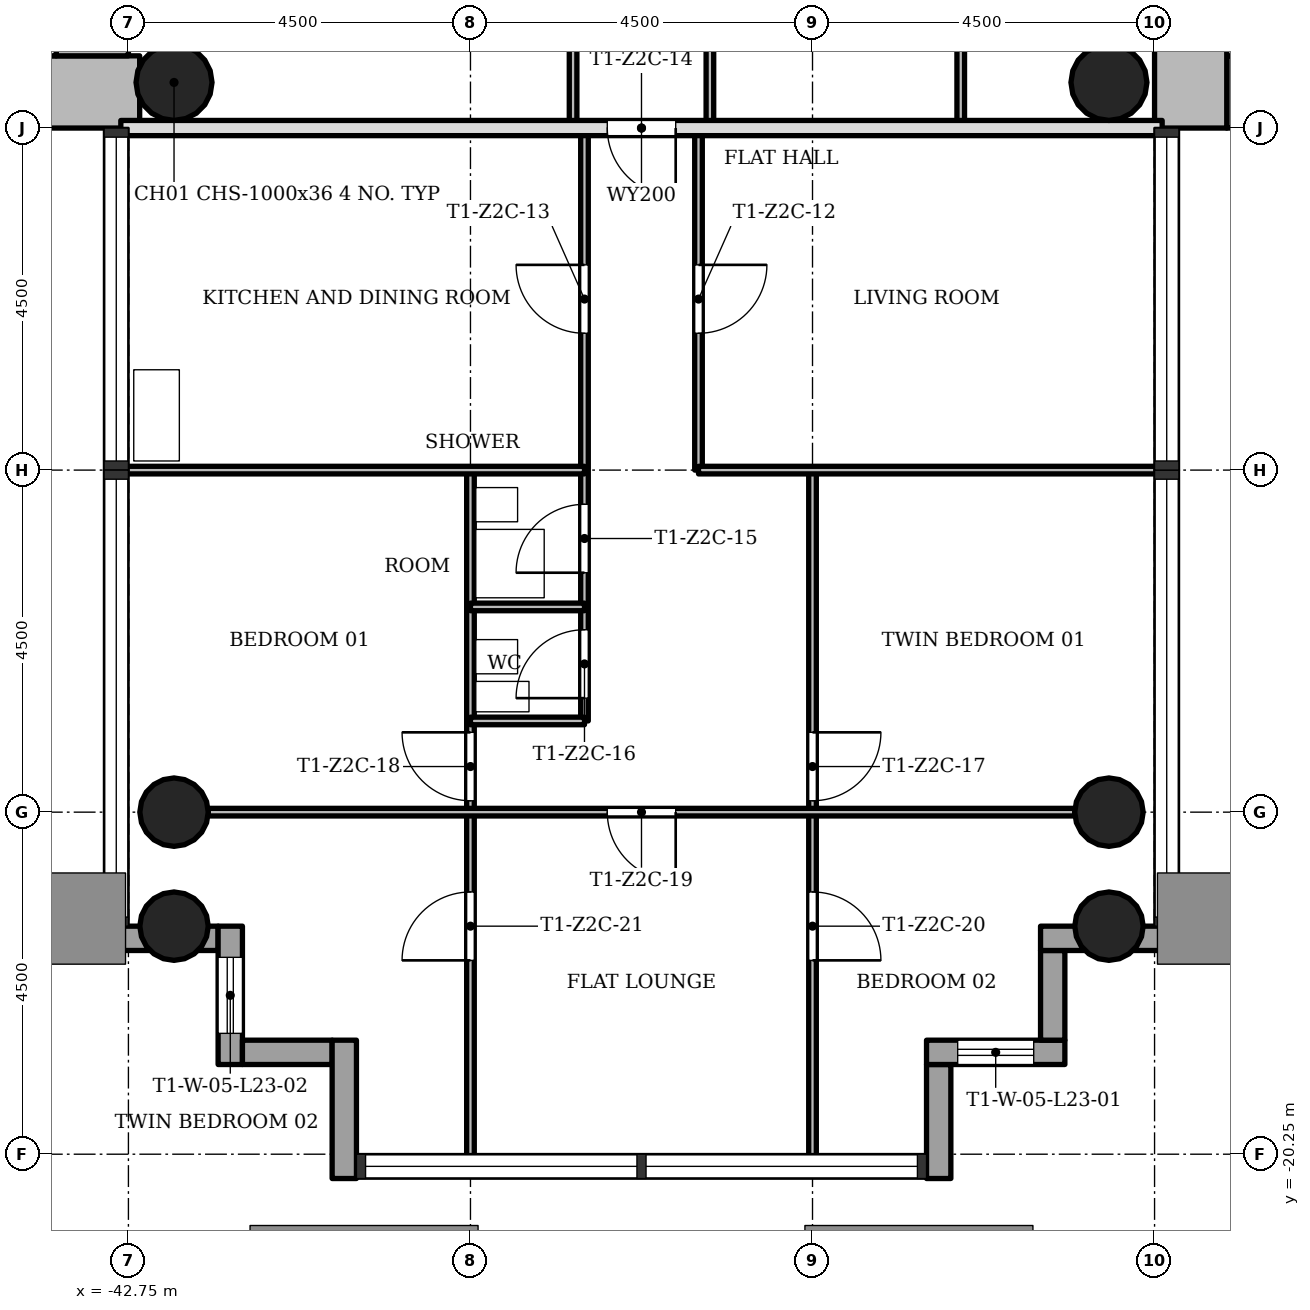
"""IFC4 building model, lengths in metres.
Left out: names, types, materials, properties, quantities, classifications, styles, units other than length and angle.
Written with IfcOpenShell. Run it as: python <this file> out.ifc"""

import sys

from ifc_helpers import new_model, si_unit, direction, frame, frame_2d, origin, origin_2d, place, context, subcontext, project, spatial, rectangle, hollow_circle, extrude, element, fill, save


model = new_model("IFC4")
c1 = context("Model", 3, precision=1e-05, world=origin(), true_north=direction((0.0, 1.0)))
c2 = subcontext(c1, "Body", "Model", "MODEL_VIEW")
j1 = project(units=[si_unit("LENGTHUNIT", "METRE"), si_unit("PLANEANGLEUNIT", "RADIAN")], contexts=[c1])
p1 = place(None, origin())
s1 = spatial("IfcSite", under=j1, at=p1, CompositionType="ELEMENT")
p2 = place(p1, origin())
s2 = spatial("IfcBuilding", under=s1, at=p2, CompositionType="ELEMENT")
p3 = place(p2, frame((0.0, 0.0, 86.8)))
s3 = spatial("IfcBuildingStorey", under=s2, at=p3, CompositionType="ELEMENT", Elevation=86.8)
p4 = place(p3, frame((-28.3, -6.275, 0.0), z_axis=(0.0, 0.0, 1.0), x_axis=(1.0, 0.0, 0.0)))
e1 = element("IfcWall", 1, at=p4, inside=s3, PredefinedType="SHEAR", context=c2, shape_type="SweptSolid", body=[
    extrude(rectangle(XDim=8.05, YDim=0.95, at=frame_2d((4.025, 0.0))), origin(), (0.0, 0.0, 1.0), 3.4),
])
p5 = place(p3, frame((-28.775, 5.8, 0.0), z_axis=(0.0, 0.0, 1.0), x_axis=(0.0, -1.0, 0.0)))
e2 = element("IfcWall", 2, at=p5, inside=s3, PredefinedType="SHEAR", context=c2, shape_type="SweptSolid", body=[
    extrude(rectangle(XDim=12.55, YDim=0.95, at=frame_2d((6.275, 0.0))), origin(), (0.0, 0.0, 1.0), 3.4),
])
p6 = place(p5, frame((4.9, 0.0, 0.0)))
e3 = element("IfcOpeningElement", 3, at=p6, cuts=e2, PredefinedType="OPENING", context=c2, shape_type="SweptSolid", body=[
    extrude(rectangle(XDim=1.8, YDim=2.1, at=frame_2d((0.9, 1.05))), frame((0.0, 0.485, 0.0), z_axis=(0.0, -1.0, 0.0), x_axis=(1.0, 0.0, 0.0)), (0.0, 0.0, 1.0), 0.97),
])
p7 = place(p3, frame((-51.298, -6.275, 0.0), z_axis=(0.0, 0.0, 1.0), x_axis=(1.0, 0.0, 0.0)))
e4 = element("IfcWall", 4, at=p7, inside=s3, PredefinedType="SHEAR", context=c2, shape_type="SweptSolid", body=[
    extrude(rectangle(XDim=8.696, YDim=0.95, at=frame_2d((4.348, 0.0))), origin(), (0.0, 0.0, 1.0), 3.4),
])
p8 = place(p3, frame((-43.225, -5.8, 0.0), z_axis=(0.0, 0.0, 1.0), x_axis=(0.0, 1.0, 0.0)))
e5 = element("IfcWall", 5, at=p8, inside=s3, PredefinedType="SHEAR", context=c2, shape_type="SweptSolid", body=[
    extrude(rectangle(XDim=12.55, YDim=0.95, at=frame_2d((6.275, 0.0))), origin(), (0.0, 0.0, 1.0), 3.4),
])
p9 = place(p8, frame((4.9, 0.0, 0.0)))
e6 = element("IfcOpeningElement", 6, at=p9, cuts=e5, PredefinedType="OPENING", context=c2, shape_type="SweptSolid", body=[
    extrude(rectangle(XDim=1.8, YDim=2.1, at=frame_2d((0.9, 1.05))), frame((0.0, 0.485, 0.0), z_axis=(0.0, -1.0, 0.0), x_axis=(1.0, 0.0, 0.0)), (0.0, 0.0, 1.0), 0.97),
])
for number, where, z_axis, x_axis in (
    (7, (-42.15, -15.75, 0.0), (0.0, 0.0, 1.0), (1.0, 0.0, 0.0)),
    (8, (-29.85, -15.75, 0.0), (0.0, 0.0, 1.0), (1.0, 0.0, 0.0)),
    (9, (-42.15, -17.25, 0.0), (0.0, 0.0, 1.0), (1.0, 0.0, 0.0)),
    (10, (-29.85, -17.25, 0.0), (0.0, 0.0, 1.0), (1.0, 0.0, 0.0)),
):
    element("IfcColumn", number, at=place(p3, frame(where, z_axis=z_axis, x_axis=x_axis)), inside=s3, PredefinedType="COLUMN", context=c2, shape_type="SweptSolid", body=[
        extrude(hollow_circle(Radius=0.45, WallThickness=0.032, at=origin_2d()), origin(), (0.0, 0.0, 1.0), 3.4),
    ])
for number, where, z_axis, x_axis in (
    (11, (-42.15, -6.15, 0.0), (0.0, 0.0, 1.0), (1.0, 0.0, 0.0)),
    (12, (-29.85, -6.15, 0.0), (0.0, 0.0, 1.0), (1.0, 0.0, 0.0)),
):
    element("IfcColumn", number, at=place(p3, frame(where, z_axis=z_axis, x_axis=x_axis)), inside=s3, PredefinedType="COLUMN", context=c2, shape_type="SweptSolid", body=[
        extrude(hollow_circle(Radius=0.5, WallThickness=0.036, at=origin_2d()), origin(), (0.0, 0.0, 1.0), 3.4),
    ])
p10 = place(p3, frame((-43.07, -17.41, -0.3), z_axis=(0.0, 0.0, 1.0), x_axis=(1.0, 0.0, 0.0)))
e13 = element("IfcWall", 13, at=p10, inside=s3, PredefinedType="STANDARD", context=c2, shape_type="SweptSolid", body=[
    extrude(rectangle(XDim=1.5, YDim=0.32, at=frame_2d((0.75, 0.0))), origin(), (0.0, 0.0, 1.0), 3.4),
])
p11 = place(p3, frame((-41.41, -17.25, -0.3), z_axis=(0.0, 0.0, 1.0), x_axis=(0.0, -1.0, 0.0)))
e14 = element("IfcWall", 14, at=p11, inside=s3, PredefinedType="STANDARD", context=c2, shape_type="SweptSolid", body=[
    extrude(rectangle(XDim=1.82, YDim=0.32, at=frame_2d((0.91, 0.0))), origin(), (0.0, 0.0, 1.0), 3.4),
])
p12 = place(p11, frame((0.41, 0.0, 1.2)))
e15 = element("IfcOpeningElement", 15, at=p12, cuts=e14, PredefinedType="OPENING", context=c2, shape_type="SweptSolid", body=[
    extrude(rectangle(XDim=1.0, YDim=1.5, at=frame_2d((0.5, 0.75))), frame((0.0, 0.17, 0.0), z_axis=(0.0, -1.0, 0.0), x_axis=(1.0, 0.0, 0.0)), (0.0, 0.0, 1.0), 0.34),
])
p13 = place(p3, frame((-41.25, -18.91, -0.3), z_axis=(0.0, 0.0, 1.0), x_axis=(1.0, 0.0, 0.0)))
e16 = element("IfcWall", 16, at=p13, inside=s3, PredefinedType="STANDARD", context=c2, shape_type="SweptSolid", body=[
    extrude(rectangle(XDim=1.18, YDim=0.32, at=frame_2d((0.59, 0.0))), origin(), (0.0, 0.0, 1.0), 3.4),
])
p14 = place(p3, frame((-39.91, -18.75, -0.3), z_axis=(0.0, 0.0, 1.0), x_axis=(0.0, -1.0, 0.0)))
e17 = element("IfcWall", 17, at=p14, inside=s3, PredefinedType="STANDARD", context=c2, shape_type="SweptSolid", body=[
    extrude(rectangle(XDim=1.82, YDim=0.32, at=frame_2d((0.91, 0.0))), origin(), (0.0, 0.0, 1.0), 3.4),
])
p15 = place(p3, frame((-32.09, -20.57, -0.3), z_axis=(0.0, 0.0, 1.0), x_axis=(0.0, 1.0, 0.0)))
e18 = element("IfcWall", 18, at=p15, inside=s3, PredefinedType="STANDARD", context=c2, shape_type="SweptSolid", body=[
    extrude(rectangle(XDim=1.5, YDim=0.32, at=frame_2d((0.75, 0.0))), origin(), (0.0, 0.0, 1.0), 3.4),
])
p16 = place(p3, frame((-32.25, -18.91, -0.3), z_axis=(0.0, 0.0, 1.0), x_axis=(1.0, 0.0, 0.0)))
e19 = element("IfcWall", 19, at=p16, inside=s3, PredefinedType="STANDARD", context=c2, shape_type="SweptSolid", body=[
    extrude(rectangle(XDim=1.82, YDim=0.32, at=frame_2d((0.91, 0.0))), origin(), (0.0, 0.0, 1.0), 3.4),
])
p17 = place(p16, frame((0.41, 0.0, 1.2)))
e20 = element("IfcOpeningElement", 20, at=p17, cuts=e19, PredefinedType="OPENING", context=c2, shape_type="SweptSolid", body=[
    extrude(rectangle(XDim=1.0, YDim=1.5, at=frame_2d((0.5, 0.75))), frame((0.0, 0.17, 0.0), z_axis=(0.0, -1.0, 0.0), x_axis=(1.0, 0.0, 0.0)), (0.0, 0.0, 1.0), 0.34),
])
p18 = place(p3, frame((-30.59, -18.75, -0.3), z_axis=(0.0, 0.0, 1.0), x_axis=(0.0, 1.0, 0.0)))
e21 = element("IfcWall", 21, at=p18, inside=s3, PredefinedType="STANDARD", context=c2, shape_type="SweptSolid", body=[
    extrude(rectangle(XDim=1.18, YDim=0.32, at=frame_2d((0.59, 0.0))), origin(), (0.0, 0.0, 1.0), 3.4),
])
p19 = place(p3, frame((-30.75, -17.41, -0.3), z_axis=(0.0, 0.0, 1.0), x_axis=(1.0, 0.0, 0.0)))
e22 = element("IfcWall", 22, at=p19, inside=s3, PredefinedType="STANDARD", context=c2, shape_type="SweptSolid", body=[
    extrude(rectangle(XDim=1.82, YDim=0.32, at=frame_2d((0.91, 0.0))), origin(), (0.0, 0.0, 1.0), 3.4),
])
p20 = place(p3, frame((-38.25, -20.35, 0.0), z_axis=(0.0, 0.0, 1.0), x_axis=(0.0, 1.0, 0.0)))
e23 = element("IfcWall", 23, at=p20, inside=s3, PredefinedType="PARTITIONING", context=c2, shape_type="SweptSolid", body=[
    extrude(rectangle(XDim=9.1, YDim=0.1, at=frame_2d((4.55, 0.0))), origin(), (0.0, 0.0, 1.0), 3.0),
])
p21 = place(p20, frame((4.75, 0.0, 0.0)))
e24 = element("IfcOpeningElement", 24, at=p21, cuts=e23, PredefinedType="OPENING", context=c2, shape_type="SweptSolid", body=[
    extrude(rectangle(XDim=0.9, YDim=2.1, at=frame_2d((0.45, 1.05))), frame((0.0, 0.06, 0.0), z_axis=(0.0, -1.0, 0.0), x_axis=(1.0, 0.0, 0.0)), (0.0, 0.0, 1.0), 0.12),
])
p22 = place(p20, frame((2.65, 0.0, 0.0)))
e25 = element("IfcOpeningElement", 25, at=p22, cuts=e23, PredefinedType="OPENING", context=c2, shape_type="SweptSolid", body=[
    extrude(rectangle(XDim=0.9, YDim=2.1, at=frame_2d((0.45, 1.05))), frame((0.0, 0.06, 0.0), z_axis=(0.0, -1.0, 0.0), x_axis=(1.0, 0.0, 0.0)), (0.0, 0.0, 1.0), 0.12),
])
p23 = place(p3, frame((-36.9, -6.75, 0.0), z_axis=(0.0, 0.0, 1.0), x_axis=(0.0, 1.0, 0.0)))
e26 = element("IfcWall", 26, at=p23, inside=s3, PredefinedType="PARTITIONING", context=c2, shape_type="SweptSolid", body=[
    extrude(rectangle(XDim=5.25, YDim=0.1, at=frame_2d((2.625, 0.0))), origin(), (0.0, 0.0, 1.0), 3.0),
])
p24 = place(p3, frame((-36.75, -14.55, 0.0), z_axis=(0.0, 0.0, 1.0), x_axis=(0.0, 1.0, 0.0)))
e27 = element("IfcWall", 27, at=p24, inside=s3, PredefinedType="PARTITIONING", context=c2, shape_type="SweptSolid", body=[
    extrude(rectangle(XDim=7.8, YDim=0.1, at=frame_2d((3.9, 0.0))), origin(), (0.0, 0.0, 1.0), 3.0),
])
p25 = place(p24, frame((5.1, 0.0, 0.0)))
e28 = element("IfcOpeningElement", 28, at=p25, cuts=e27, PredefinedType="OPENING", context=c2, shape_type="SweptSolid", body=[
    extrude(rectangle(XDim=0.9, YDim=2.1, at=frame_2d((0.45, 1.05))), frame((0.0, 0.06, 0.0), z_axis=(0.0, -1.0, 0.0), x_axis=(1.0, 0.0, 0.0)), (0.0, 0.0, 1.0), 0.12),
])
p26 = place(p24, frame((1.95, 0.0, 0.0)))
e29 = element("IfcOpeningElement", 29, at=p26, cuts=e27, PredefinedType="OPENING", context=c2, shape_type="SweptSolid", body=[
    extrude(rectangle(XDim=0.9, YDim=2.1, at=frame_2d((0.45, 1.05))), frame((0.0, 0.06, 0.0), z_axis=(0.0, -1.0, 0.0), x_axis=(1.0, 0.0, 0.0)), (0.0, 0.0, 1.0), 0.12),
])
p27 = place(p24, frame((0.3, 0.0, 0.0)))
e30 = element("IfcOpeningElement", 30, at=p27, cuts=e27, PredefinedType="OPENING", context=c2, shape_type="SweptSolid", body=[
    extrude(rectangle(XDim=0.9, YDim=2.1, at=frame_2d((0.45, 1.05))), frame((0.0, 0.06, 0.0), z_axis=(0.0, -1.0, 0.0), x_axis=(1.0, 0.0, 0.0)), (0.0, 0.0, 1.0), 0.12),
])
p28 = place(p3, frame((-35.25, -11.25, 0.0), z_axis=(0.0, 0.0, 1.0), x_axis=(0.0, 1.0, 0.0)))
e31 = element("IfcWall", 31, at=p28, inside=s3, PredefinedType="PARTITIONING", context=c2, shape_type="SweptSolid", body=[
    extrude(rectangle(XDim=4.5, YDim=0.1, at=frame_2d((2.25, 0.0))), origin(), (0.0, 0.0, 1.0), 3.0),
])
p29 = place(p28, frame((1.8, 0.0, 0.0)))
e32 = element("IfcOpeningElement", 32, at=p29, cuts=e31, PredefinedType="OPENING", context=c2, shape_type="SweptSolid", body=[
    extrude(rectangle(XDim=0.9, YDim=2.1, at=frame_2d((0.45, 1.05))), frame((0.0, 0.06, 0.0), z_axis=(0.0, -1.0, 0.0), x_axis=(1.0, 0.0, 0.0)), (0.0, 0.0, 1.0), 0.12),
])
p30 = place(p3, frame((-35.1, -6.75, 0.0), z_axis=(0.0, 0.0, 1.0), x_axis=(0.0, 1.0, 0.0)))
e33 = element("IfcWall", 33, at=p30, inside=s3, PredefinedType="PARTITIONING", context=c2, shape_type="SweptSolid", body=[
    extrude(rectangle(XDim=5.25, YDim=0.1, at=frame_2d((2.625, 0.0))), origin(), (0.0, 0.0, 1.0), 3.0),
])
p31 = place(p30, frame((2.175, 0.0, 0.0)))
e34 = element("IfcOpeningElement", 34, at=p31, cuts=e33, PredefinedType="OPENING", context=c2, shape_type="SweptSolid", body=[
    extrude(rectangle(XDim=0.9, YDim=2.1, at=frame_2d((0.45, 1.05))), frame((0.0, 0.06, 0.0), z_axis=(0.0, -1.0, 0.0), x_axis=(1.0, 0.0, 0.0)), (0.0, 0.0, 1.0), 0.12),
])
p32 = place(p3, frame((-33.75, -20.35, 0.0), z_axis=(0.0, 0.0, 1.0), x_axis=(0.0, 1.0, 0.0)))
e35 = element("IfcWall", 35, at=p32, inside=s3, PredefinedType="PARTITIONING", context=c2, shape_type="SweptSolid", body=[
    extrude(rectangle(XDim=9.1, YDim=0.1, at=frame_2d((4.55, 0.0))), origin(), (0.0, 0.0, 1.0), 3.0),
])
p33 = place(p32, frame((4.75, 0.0, 0.0)))
e36 = element("IfcOpeningElement", 36, at=p33, cuts=e35, PredefinedType="OPENING", context=c2, shape_type="SweptSolid", body=[
    extrude(rectangle(XDim=0.9, YDim=2.1, at=frame_2d((0.45, 1.05))), frame((0.0, 0.06, 0.0), z_axis=(0.0, -1.0, 0.0), x_axis=(1.0, 0.0, 0.0)), (0.0, 0.0, 1.0), 0.12),
])
p34 = place(p32, frame((2.65, 0.0, 0.0)))
e37 = element("IfcOpeningElement", 37, at=p34, cuts=e35, PredefinedType="OPENING", context=c2, shape_type="SweptSolid", body=[
    extrude(rectangle(XDim=0.9, YDim=2.1, at=frame_2d((0.45, 1.05))), frame((0.0, 0.06, 0.0), z_axis=(0.0, -1.0, 0.0), x_axis=(1.0, 0.0, 0.0)), (0.0, 0.0, 1.0), 0.12),
])
p35 = place(p3, frame((-31.8, -6.75, 0.0), z_axis=(0.0, 0.0, 1.0), x_axis=(0.0, 1.0, 0.0)))
e38 = element("IfcWall", 38, at=p35, inside=s3, PredefinedType="PARTITIONING", context=c2, shape_type="SweptSolid", body=[
    extrude(rectangle(XDim=5.25, YDim=0.1, at=frame_2d((2.625, 0.0))), origin(), (0.0, 0.0, 1.0), 3.0),
])
p36 = place(p3, frame((-41.7, -15.75, 0.0), z_axis=(0.0, 0.0, 1.0), x_axis=(1.0, 0.0, 0.0)))
e39 = element("IfcWall", 39, at=p36, inside=s3, PredefinedType="PARTITIONING", context=c2, shape_type="SweptSolid", body=[
    extrude(rectangle(XDim=11.4, YDim=0.1, at=frame_2d((5.7, 0.0))), origin(), (0.0, 0.0, 1.0), 3.0),
])
p37 = place(p36, frame((5.25, 0.0, 0.0)))
e40 = element("IfcOpeningElement", 40, at=p37, cuts=e39, PredefinedType="OPENING", context=c2, shape_type="SweptSolid", body=[
    extrude(rectangle(XDim=0.9, YDim=2.1, at=frame_2d((0.45, 1.05))), frame((0.0, 0.06, 0.0), z_axis=(0.0, -1.0, 0.0), x_axis=(1.0, 0.0, 0.0)), (0.0, 0.0, 1.0), 0.12),
])
for number, where, z_axis, x_axis in (
    (41, (-38.25, -14.55, 0.0), (0.0, 0.0, 1.0), (1.0, 0.0, 0.0)),
    (42, (-38.25, -13.05, 0.0), (0.0, 0.0, 1.0), (1.0, 0.0, 0.0)),
):
    element("IfcWall", number, at=place(p3, frame(where, z_axis=z_axis, x_axis=x_axis)), inside=s3, PredefinedType="PARTITIONING", context=c2, shape_type="SweptSolid", body=[
        extrude(rectangle(XDim=1.5, YDim=0.1, at=frame_2d((0.75, 0.0))), origin(), (0.0, 0.0, 1.0), 3.0),
    ])
for number, where, z_axis, x_axis in (
    (43, (-42.85, -11.25, 0.0), (0.0, 0.0, 1.0), (1.0, 0.0, 0.0)),
    (44, (-35.25, -11.25, 0.0), (0.0, 0.0, 1.0), (1.0, 0.0, 0.0)),
):
    element("IfcWall", number, at=place(p3, frame(where, z_axis=z_axis, x_axis=x_axis)), inside=s3, PredefinedType="PARTITIONING", context=c2, shape_type="SweptSolid", body=[
        extrude(rectangle(XDim=6.1, YDim=0.1, at=frame_2d((3.05, 0.0))), origin(), (0.0, 0.0, 1.0), 3.0),
    ])
p38 = place(p3, frame((-42.85, -6.75, 0.0), z_axis=(0.0, 0.0, 1.0), x_axis=(1.0, 0.0, 0.0)))
e45 = element("IfcWall", 45, at=p38, inside=s3, PredefinedType="SOLIDWALL", context=c2, shape_type="SweptSolid", body=[
    extrude(rectangle(XDim=13.7, YDim=0.2, at=frame_2d((6.85, 0.0))), origin(), (0.0, 0.0, 1.0), 3.0),
])
p39 = place(p38, frame((6.4, 0.0, 0.0)))
e46 = element("IfcOpeningElement", 46, at=p39, cuts=e45, PredefinedType="OPENING", context=c2, shape_type="SweptSolid", body=[
    extrude(rectangle(XDim=0.9, YDim=2.1, at=frame_2d((0.45, 1.05))), frame((0.0, 0.11, 0.0), z_axis=(0.0, -1.0, 0.0), x_axis=(1.0, 0.0, 0.0)), (0.0, 0.0, 1.0), 0.22),
])
p40 = place(p3, frame((-43.825, -1.9, 0.0), z_axis=(0.0, 0.0, 1.0), x_axis=(0.0, -1.0, 0.0)))
e47 = element("IfcWall", 47, at=p40, inside=s3, PredefinedType="SHEAR", context=c2, shape_type="SweptSolid", body=[
    extrude(rectangle(XDim=3.9, YDim=0.25, at=frame_2d((1.95, 0.0))), origin(), (0.0, 0.0, 1.0), 3.4),
])
p41 = place(p29, origin())
e48 = element("IfcDoor", 48, at=p41, inside=s3, OperationType="SINGLE_SWING_RIGHT", PredefinedType="DOOR", context=c2, shape_type="SweptSolid", body=[
    extrude(rectangle(XDim=0.9, YDim=2.1, at=frame_2d((0.45, 1.05))), frame((0.0, 0.025, 0.0), z_axis=(0.0, -1.0, 0.0), x_axis=(1.0, 0.0, 0.0)), (0.0, 0.0, 1.0), 0.05),
])
fill(e32, e48)
p42 = place(p25, origin())
e49 = element("IfcDoor", 49, at=p42, inside=s3, OperationType="SINGLE_SWING_LEFT", PredefinedType="DOOR", context=c2, shape_type="SweptSolid", body=[
    extrude(rectangle(XDim=0.9, YDim=2.1, at=frame_2d((0.45, 1.05))), frame((0.0, 0.025, 0.0), z_axis=(0.0, -1.0, 0.0), x_axis=(1.0, 0.0, 0.0)), (0.0, 0.0, 1.0), 0.05),
])
fill(e28, e49)
p43 = place(p39, origin())
e50 = element("IfcDoor", 50, at=p43, inside=s3, OperationType="SINGLE_SWING_RIGHT", PredefinedType="DOOR", context=c2, shape_type="SweptSolid", body=[
    extrude(rectangle(XDim=0.9, YDim=2.1, at=frame_2d((0.45, 1.05))), frame((0.0, 0.025, 0.0), z_axis=(0.0, -1.0, 0.0), x_axis=(1.0, 0.0, 0.0)), (0.0, 0.0, 1.0), 0.05),
])
fill(e46, e50)
p44 = place(p26, origin())
e51 = element("IfcDoor", 51, at=p44, inside=s3, OperationType="SINGLE_SWING_RIGHT", PredefinedType="DOOR", context=c2, shape_type="SweptSolid", body=[
    extrude(rectangle(XDim=0.9, YDim=2.1, at=frame_2d((0.45, 1.05))), frame((0.0, 0.025, 0.0), z_axis=(0.0, -1.0, 0.0), x_axis=(1.0, 0.0, 0.0)), (0.0, 0.0, 1.0), 0.05),
])
fill(e29, e51)
p45 = place(p27, origin())
e52 = element("IfcDoor", 52, at=p45, inside=s3, OperationType="SINGLE_SWING_RIGHT", PredefinedType="DOOR", context=c2, shape_type="SweptSolid", body=[
    extrude(rectangle(XDim=0.9, YDim=2.1, at=frame_2d((0.45, 1.05))), frame((0.0, 0.025, 0.0), z_axis=(0.0, -1.0, 0.0), x_axis=(1.0, 0.0, 0.0)), (0.0, 0.0, 1.0), 0.05),
])
fill(e30, e52)
p46 = place(p33, origin())
e53 = element("IfcDoor", 53, at=p46, inside=s3, OperationType="SINGLE_SWING_RIGHT", PredefinedType="DOOR", context=c2, shape_type="SweptSolid", body=[
    extrude(rectangle(XDim=0.9, YDim=2.1, at=frame_2d((0.45, 1.05))), frame((0.0, 0.025, 0.0), z_axis=(0.0, -1.0, 0.0), x_axis=(1.0, 0.0, 0.0)), (0.0, 0.0, 1.0), 0.05),
])
fill(e36, e53)
p47 = place(p21, origin())
e54 = element("IfcDoor", 54, at=p47, inside=s3, OperationType="SINGLE_SWING_LEFT", PredefinedType="DOOR", context=c2, shape_type="SweptSolid", body=[
    extrude(rectangle(XDim=0.9, YDim=2.1, at=frame_2d((0.45, 1.05))), frame((0.0, 0.025, 0.0), z_axis=(0.0, -1.0, 0.0), x_axis=(1.0, 0.0, 0.0)), (0.0, 0.0, 1.0), 0.05),
])
fill(e24, e54)
p48 = place(p37, origin())
e55 = element("IfcDoor", 55, at=p48, inside=s3, OperationType="SINGLE_SWING_RIGHT", PredefinedType="DOOR", context=c2, shape_type="SweptSolid", body=[
    extrude(rectangle(XDim=0.9, YDim=2.1, at=frame_2d((0.45, 1.05))), frame((0.0, 0.025, 0.0), z_axis=(0.0, -1.0, 0.0), x_axis=(1.0, 0.0, 0.0)), (0.0, 0.0, 1.0), 0.05),
])
fill(e40, e55)
p49 = place(p34, origin())
e56 = element("IfcDoor", 56, at=p49, inside=s3, OperationType="SINGLE_SWING_LEFT", PredefinedType="DOOR", context=c2, shape_type="SweptSolid", body=[
    extrude(rectangle(XDim=0.9, YDim=2.1, at=frame_2d((0.45, 1.05))), frame((0.0, 0.025, 0.0), z_axis=(0.0, -1.0, 0.0), x_axis=(1.0, 0.0, 0.0)), (0.0, 0.0, 1.0), 0.05),
])
fill(e37, e56)
p50 = place(p22, origin())
e57 = element("IfcDoor", 57, at=p50, inside=s3, OperationType="SINGLE_SWING_RIGHT", PredefinedType="DOOR", context=c2, shape_type="SweptSolid", body=[
    extrude(rectangle(XDim=0.9, YDim=2.1, at=frame_2d((0.45, 1.05))), frame((0.0, 0.025, 0.0), z_axis=(0.0, -1.0, 0.0), x_axis=(1.0, 0.0, 0.0)), (0.0, 0.0, 1.0), 0.05),
])
fill(e25, e57)
p51 = place(p17, origin())
e58 = element("IfcWindow", 58, at=p51, inside=s3, PartitioningType="SINGLE_PANEL", PredefinedType="WINDOW", context=c2, shape_type="SweptSolid", body=[
    extrude(rectangle(XDim=1.0, YDim=1.5, at=frame_2d((0.5, 0.75))), frame((0.0, 0.03, 0.0), z_axis=(0.0, -1.0, 0.0), x_axis=(1.0, 0.0, 0.0)), (0.0, 0.0, 1.0), 0.06),
])
fill(e20, e58)
p52 = place(p12, origin())
e59 = element("IfcWindow", 59, at=p52, inside=s3, PartitioningType="SINGLE_PANEL", PredefinedType="WINDOW", context=c2, shape_type="SweptSolid", body=[
    extrude(rectangle(XDim=1.0, YDim=1.5, at=frame_2d((0.5, 0.75))), frame((0.0, 0.03, 0.0), z_axis=(0.0, -1.0, 0.0), x_axis=(1.0, 0.0, 0.0)), (0.0, 0.0, 1.0), 0.06),
])
fill(e15, e59)
save(model, sys.argv[1])
